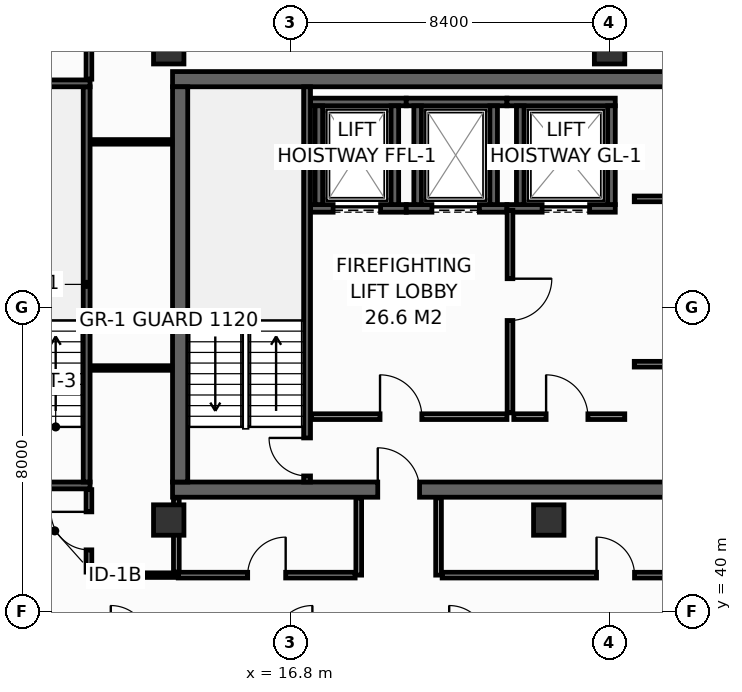
"""IFC4 building model, lengths in metres.
Left out: names, types, materials, properties, quantities, classifications, styles, units other than length and angle.
Written with IfcOpenShell. Run it as: python <this file> out.ifc"""

import sys

from ifc_helpers import new_model, si_unit, direction, frame, frame_2d, origin, origin_2d, place, context, subcontext, project, spatial, rectangle, hollow_rectangle, extrude, element, fill, save


model = new_model("IFC4")
c1 = context("Model", 3, precision=1e-05, world=origin(), true_north=direction((0.0, 1.0)))
c2 = subcontext(c1, "Body", "Model", "MODEL_VIEW")
j1 = project(units=[si_unit("LENGTHUNIT", "METRE"), si_unit("PLANEANGLEUNIT", "RADIAN")], contexts=[c1])
p1 = place(None, origin())
s1 = spatial("IfcSite", under=j1, at=p1, CompositionType="ELEMENT")
p2 = place(p1, origin())
s2 = spatial("IfcBuilding", under=s1, at=p2, CompositionType="ELEMENT")
p3 = place(p2, frame((0.0, 0.0, 238.2)))
s3 = spatial("IfcBuildingStorey", under=s2, at=p3, CompositionType="ELEMENT", Elevation=238.2)
p4 = place(p3, frame((13.7, 43.2, 0.0), z_axis=(0.0, 0.0, 1.0), x_axis=(1.0, 0.0, 0.0)))
e1 = element("IfcWall", 1, at=p4, inside=s3, PredefinedType="SHEAR", context=c2, shape_type="SweptSolid", body=[
    extrude(rectangle(XDim=32.5, YDim=0.4, at=frame_2d((16.25, 0.0))), origin(), (0.0, 0.0, 1.0), 3.55),
])
p5 = place(p4, frame((5.4, 0.0, 0.0)))
e2 = element("IfcOpeningElement", 2, at=p5, cuts=e1, PredefinedType="OPENING", context=c2, shape_type="SweptSolid", body=[
    extrude(rectangle(XDim=1.1, YDim=2.15, at=frame_2d((0.55, 1.075))), frame((0.0, 0.21, 0.0), z_axis=(0.0, -1.0, 0.0), x_axis=(1.0, 0.0, 0.0)), (0.0, 0.0, 1.0), 0.42),
])
p6 = place(p4, frame((25.6, 0.0, 0.0)))
e3 = element("IfcOpeningElement", 3, at=p6, cuts=e1, PredefinedType="OPENING", context=c2, shape_type="SweptSolid", body=[
    extrude(rectangle(XDim=1.1, YDim=2.15, at=frame_2d((0.55, 1.075))), frame((0.0, 0.21, 0.0), z_axis=(0.0, -1.0, 0.0), x_axis=(1.0, 0.0, 0.0)), (0.0, 0.0, 1.0), 0.42),
])
p7 = place(p3, frame((13.7, 54.0, 0.0), z_axis=(0.0, 0.0, 1.0), x_axis=(1.0, 0.0, 0.0)))
e4 = element("IfcWall", 4, at=p7, inside=s3, PredefinedType="SHEAR", context=c2, shape_type="SweptSolid", body=[
    extrude(rectangle(XDim=32.5, YDim=0.4, at=frame_2d((16.25, 0.0))), origin(), (0.0, 0.0, 1.0), 3.55),
])
p8 = place(p3, frame((13.9, 43.4, 0.0), z_axis=(0.0, 0.0, 1.0), x_axis=(0.0, 1.0, 0.0)))
e5 = element("IfcWall", 5, at=p8, inside=s3, PredefinedType="SHEAR", context=c2, shape_type="SweptSolid", body=[
    extrude(rectangle(XDim=10.4, YDim=0.4, at=frame_2d((5.2, 0.0))), origin(), (0.0, 0.0, 1.0), 3.55),
])
for number, where, z_axis, x_axis in (
    (6, (13.6, 54.8, 0.0), (0.0, 0.0, 1.0), (1.0, 0.0, 0.0)),
    (7, (25.2, 54.8, 0.0), (0.0, 0.0, 1.0), (1.0, 0.0, 0.0)),
    (8, (13.6, 42.4, 0.0), (0.0, 0.0, 1.0), (1.0, 0.0, 0.0)),
    (9, (23.6, 42.4, 0.0), (0.0, 0.0, 1.0), (1.0, 0.0, 0.0)),
):
    element("IfcColumn", number, at=place(p3, frame(where, z_axis=z_axis, x_axis=x_axis)), inside=s3, PredefinedType="COLUMN", context=c2, shape_type="SweptSolid", body=[
        extrude(hollow_rectangle(XDim=0.8, YDim=0.8, WallThickness=0.036, at=origin_2d()), origin(), (0.0, 0.0, 1.0), 3.8),
    ])
p9 = place(p3, frame((17.33, 50.6, 0.0), z_axis=(0.0, 0.0, 1.0), x_axis=(1.0, 0.0, 0.0)))
e10 = element("IfcWall", 10, at=p9, inside=s3, PredefinedType="SHEAR", context=c2, shape_type="SweptSolid", body=[
    extrude(rectangle(XDim=2.52, YDim=0.2, at=frame_2d((1.26, 0.0))), origin(), (0.0, 0.0, 1.0), 3.55),
])
p10 = place(p9, frame((0.595, 0.0, 0.0)))
e11 = element("IfcOpeningElement", 11, at=p10, cuts=e10, PredefinedType="OPENING", context=c2, shape_type="SweptSolid", body=[
    extrude(rectangle(XDim=1.25, YDim=2.3, at=frame_2d((0.625, 1.15))), frame((0.0, 0.11, 0.0), z_axis=(0.0, -1.0, 0.0), x_axis=(1.0, 0.0, 0.0)), (0.0, 0.0, 1.0), 0.22),
])
p11 = place(p3, frame((17.33, 53.4, 0.0), z_axis=(0.0, 0.0, 1.0), x_axis=(1.0, 0.0, 0.0)))
e12 = element("IfcWall", 12, at=p11, inside=s3, PredefinedType="SHEAR", context=c2, shape_type="SweptSolid", body=[
    extrude(rectangle(XDim=2.52, YDim=0.2, at=frame_2d((1.26, 0.0))), origin(), (0.0, 0.0, 1.0), 3.55),
])
for number, where, z_axis, x_axis in (
    (13, (17.55, 50.7, 0.0), (0.0, 0.0, 1.0), (0.0, 1.0, 0.0)),
    (14, (19.55, 50.7, 0.0), (0.0, 0.0, 1.0), (0.0, 1.0, 0.0)),
):
    element("IfcWall", number, at=place(p3, frame(where, z_axis=z_axis, x_axis=x_axis)), inside=s3, PredefinedType="SHEAR", context=c2, shape_type="SweptSolid", body=[
        extrude(rectangle(XDim=2.6, YDim=0.2, at=frame_2d((1.3, 0.0))), origin(), (0.0, 0.0, 1.0), 3.55),
    ])
p12 = place(p3, frame((19.85, 50.6, 0.0), z_axis=(0.0, 0.0, 1.0), x_axis=(1.0, 0.0, 0.0)))
e15 = element("IfcWall", 15, at=p12, inside=s3, PredefinedType="SHEAR", context=c2, shape_type="SweptSolid", body=[
    extrude(rectangle(XDim=2.65, YDim=0.2, at=frame_2d((1.325, 0.0))), origin(), (0.0, 0.0, 1.0), 3.55),
])
p13 = place(p12, frame((0.675, 0.0, 0.0)))
e16 = element("IfcOpeningElement", 16, at=p13, cuts=e15, PredefinedType="OPENING", context=c2, shape_type="SweptSolid", body=[
    extrude(rectangle(XDim=1.25, YDim=2.3, at=frame_2d((0.625, 1.15))), frame((0.0, 0.11, 0.0), z_axis=(0.0, -1.0, 0.0), x_axis=(1.0, 0.0, 0.0)), (0.0, 0.0, 1.0), 0.22),
])
p14 = place(p3, frame((19.85, 53.4, 0.0), z_axis=(0.0, 0.0, 1.0), x_axis=(1.0, 0.0, 0.0)))
e17 = element("IfcWall", 17, at=p14, inside=s3, PredefinedType="SHEAR", context=c2, shape_type="SweptSolid", body=[
    extrude(rectangle(XDim=2.65, YDim=0.2, at=frame_2d((1.325, 0.0))), origin(), (0.0, 0.0, 1.0), 3.55),
])
for number, where, z_axis, x_axis in (
    (18, (20.15, 50.7, 0.0), (0.0, 0.0, 1.0), (0.0, 1.0, 0.0)),
    (19, (22.15, 50.7, 0.0), (0.0, 0.0, 1.0), (0.0, 1.0, 0.0)),
):
    element("IfcWall", number, at=place(p3, frame(where, z_axis=z_axis, x_axis=x_axis)), inside=s3, PredefinedType="SHEAR", context=c2, shape_type="SweptSolid", body=[
        extrude(rectangle(XDim=2.6, YDim=0.2, at=frame_2d((1.3, 0.0))), origin(), (0.0, 0.0, 1.0), 3.55),
    ])
p15 = place(p3, frame((22.5, 50.6, 0.0), z_axis=(0.0, 0.0, 1.0), x_axis=(1.0, 0.0, 0.0)))
e20 = element("IfcWall", 20, at=p15, inside=s3, PredefinedType="SHEAR", context=c2, shape_type="SweptSolid", body=[
    extrude(rectangle(XDim=2.85, YDim=0.2, at=frame_2d((1.425, 0.0))), origin(), (0.0, 0.0, 1.0), 3.55),
])
p16 = place(p15, frame((0.925, 0.0, 0.0)))
e21 = element("IfcOpeningElement", 21, at=p16, cuts=e20, PredefinedType="OPENING", context=c2, shape_type="SweptSolid", body=[
    extrude(rectangle(XDim=1.25, YDim=2.3, at=frame_2d((0.625, 1.15))), frame((0.0, 0.11, 0.0), z_axis=(0.0, -1.0, 0.0), x_axis=(1.0, 0.0, 0.0)), (0.0, 0.0, 1.0), 0.22),
])
p17 = place(p3, frame((22.5, 53.4, 0.0), z_axis=(0.0, 0.0, 1.0), x_axis=(1.0, 0.0, 0.0)))
e22 = element("IfcWall", 22, at=p17, inside=s3, PredefinedType="SHEAR", context=c2, shape_type="SweptSolid", body=[
    extrude(rectangle(XDim=2.85, YDim=0.2, at=frame_2d((1.425, 0.0))), origin(), (0.0, 0.0, 1.0), 3.55),
])
for number, where, z_axis, x_axis in (
    (23, (22.85, 50.7, 0.0), (0.0, 0.0, 1.0), (0.0, 1.0, 0.0)),
    (24, (25.25, 50.7, 0.0), (0.0, 0.0, 1.0), (0.0, 1.0, 0.0)),
):
    element("IfcWall", number, at=place(p3, frame(where, z_axis=z_axis, x_axis=x_axis)), inside=s3, PredefinedType="SHEAR", context=c2, shape_type="SweptSolid", body=[
        extrude(rectangle(XDim=2.6, YDim=0.2, at=frame_2d((1.3, 0.0))), origin(), (0.0, 0.0, 1.0), 3.55),
    ])
p18 = place(p3, frame((17.24, 43.4, 0.0), z_axis=(0.0, 0.0, 1.0), x_axis=(0.0, 1.0, 0.0)))
e25 = element("IfcWall", 25, at=p18, inside=s3, PredefinedType="SHEAR", context=c2, shape_type="SweptSolid", body=[
    extrude(rectangle(XDim=10.4, YDim=0.18, at=frame_2d((5.2, 0.0))), origin(), (0.0, 0.0, 1.0), 3.55),
])
p19 = place(p18, frame((0.16, 0.0, 0.0)))
e26 = element("IfcOpeningElement", 26, at=p19, cuts=e25, PredefinedType="OPENING", context=c2, shape_type="SweptSolid", body=[
    extrude(rectangle(XDim=1.0, YDim=2.15, at=frame_2d((0.5, 1.075))), frame((0.0, 0.1, 0.0), z_axis=(0.0, -1.0, 0.0), x_axis=(1.0, 0.0, 0.0)), (0.0, 0.0, 1.0), 0.2),
])
p20 = place(p3, frame((8.12, 43.31, 0.0), z_axis=(0.0, 0.0, 1.0), x_axis=(1.0, 0.0, 0.0)))
e27 = element("IfcWall", 27, at=p20, inside=s3, PredefinedType="SHEAR", context=c2, shape_type="SweptSolid", body=[
    extrude(rectangle(XDim=3.41, YDim=0.18, at=frame_2d((1.705, 0.0))), origin(), (0.0, 0.0, 1.0), 3.55),
])
p21 = place(p20, frame((1.15, 0.0, 0.0)))
e28 = element("IfcOpeningElement", 28, at=p21, cuts=e27, PredefinedType="OPENING", context=c2, shape_type="SweptSolid", body=[
    extrude(rectangle(XDim=1.1, YDim=2.15, at=frame_2d((0.55, 1.075))), frame((0.0, 0.1, 0.0), z_axis=(0.0, -1.0, 0.0), x_axis=(1.0, 0.0, 0.0)), (0.0, 0.0, 1.0), 0.2),
])
p22 = place(p3, frame((11.44, 43.4, 0.0), z_axis=(0.0, 0.0, 1.0), x_axis=(0.0, 1.0, 0.0)))
e29 = element("IfcWall", 29, at=p22, inside=s3, PredefinedType="SHEAR", context=c2, shape_type="SweptSolid", body=[
    extrude(rectangle(XDim=10.4, YDim=0.18, at=frame_2d((5.2, 0.0))), origin(), (0.0, 0.0, 1.0), 3.55),
])
p23 = place(p3, frame((11.53, 53.89, 0.0), z_axis=(0.0, 0.0, 1.0), x_axis=(-1.0, 0.0, 0.0)))
e30 = element("IfcWall", 30, at=p23, inside=s3, PredefinedType="SHEAR", context=c2, shape_type="SweptSolid", body=[
    extrude(rectangle(XDim=3.41, YDim=0.18, at=frame_2d((1.705, 0.0))), origin(), (0.0, 0.0, 1.0), 3.55),
])
p24 = place(p3, frame((17.36, 45.12, 0.0), z_axis=(0.0, 0.0, 1.0), x_axis=(1.0, 0.0, 0.0)))
e31 = element("IfcWall", 31, at=p24, inside=s3, PredefinedType="PARTITIONING", context=c2, shape_type="SweptSolid", body=[
    extrude(rectangle(XDim=5.14, YDim=0.15, at=frame_2d((2.57, 0.0))), origin(), (0.0, 0.0, 1.0), 3.55),
])
p25 = place(p24, frame((1.8, 0.0, 0.0)))
e32 = element("IfcOpeningElement", 32, at=p25, cuts=e31, PredefinedType="OPENING", context=c2, shape_type="SweptSolid", body=[
    extrude(rectangle(XDim=1.1, YDim=2.15, at=frame_2d((0.55, 1.075))), frame((0.0, 0.085, 0.0), z_axis=(0.0, -1.0, 0.0), x_axis=(1.0, 0.0, 0.0)), (0.0, 0.0, 1.0), 0.17),
])
p26 = place(p3, frame((22.58, 50.55, 0.0), z_axis=(0.0, 0.0, 1.0), x_axis=(0.0, -1.0, 0.0)))
e33 = element("IfcWall", 33, at=p26, inside=s3, PredefinedType="PARTITIONING", context=c2, shape_type="SweptSolid", body=[
    extrude(rectangle(XDim=5.33, YDim=0.15, at=frame_2d((2.665, 0.0))), origin(), (0.0, 0.0, 1.0), 3.55),
])
p27 = place(p26, frame((1.8, 0.0, 0.0)))
e34 = element("IfcOpeningElement", 34, at=p27, cuts=e33, PredefinedType="OPENING", context=c2, shape_type="SweptSolid", body=[
    extrude(rectangle(XDim=1.1, YDim=2.15, at=frame_2d((0.55, 1.075))), frame((0.0, 0.085, 0.0), z_axis=(0.0, -1.0, 0.0), x_axis=(1.0, 0.0, 0.0)), (0.0, 0.0, 1.0), 0.17),
])
p28 = place(p3, frame((22.68, 45.12, 0.0), z_axis=(0.0, 0.0, 1.0), x_axis=(1.0, 0.0, 0.0)))
e35 = element("IfcWall", 35, at=p28, inside=s3, PredefinedType="PARTITIONING", context=c2, shape_type="SweptSolid", body=[
    extrude(rectangle(XDim=2.92, YDim=0.15, at=frame_2d((1.46, 0.0))), origin(), (0.0, 0.0, 1.0), 3.55),
])
p29 = place(p28, frame((0.85, 0.0, 0.0)))
e36 = element("IfcOpeningElement", 36, at=p29, cuts=e35, PredefinedType="OPENING", context=c2, shape_type="SweptSolid", body=[
    extrude(rectangle(XDim=1.1, YDim=2.15, at=frame_2d((0.55, 1.075))), frame((0.0, 0.085, 0.0), z_axis=(0.0, -1.0, 0.0), x_axis=(1.0, 0.0, 0.0)), (0.0, 0.0, 1.0), 0.17),
])
p30 = place(p3, frame((25.85, 50.85, 0.0), z_axis=(0.0, 0.0, 1.0), x_axis=(1.0, 0.0, 0.0)))
e37 = element("IfcWall", 37, at=p30, inside=s3, PredefinedType="PARTITIONING", context=c2, shape_type="SweptSolid", body=[
    extrude(rectangle(XDim=7.65, YDim=0.15, at=frame_2d((3.825, 0.0))), origin(), (0.0, 0.0, 1.0), 3.55),
])
p31 = place(p30, frame((1.25, 0.0, 0.0)))
e38 = element("IfcOpeningElement", 38, at=p31, cuts=e37, PredefinedType="OPENING", context=c2, shape_type="SweptSolid", body=[
    extrude(rectangle(XDim=0.95, YDim=2.15, at=frame_2d((0.475, 1.075))), frame((0.0, 0.085, 0.0), z_axis=(0.0, -1.0, 0.0), x_axis=(1.0, 0.0, 0.0)), (0.0, 0.0, 1.0), 0.17),
])
p32 = place(p3, frame((25.85, 46.5, 0.0), z_axis=(0.0, 0.0, 1.0), x_axis=(1.0, 0.0, 0.0)))
e39 = element("IfcWall", 39, at=p32, inside=s3, PredefinedType="PARTITIONING", context=c2, shape_type="SweptSolid", body=[
    extrude(rectangle(XDim=7.65, YDim=0.15, at=frame_2d((3.825, 0.0))), origin(), (0.0, 0.0, 1.0), 3.55),
])
p33 = place(p32, frame((2.8, 0.0, 0.0)))
e40 = element("IfcOpeningElement", 40, at=p33, cuts=e39, PredefinedType="OPENING", context=c2, shape_type="SweptSolid", body=[
    extrude(rectangle(XDim=0.95, YDim=2.15, at=frame_2d((0.475, 1.075))), frame((0.0, 0.085, 0.0), z_axis=(0.0, -1.0, 0.0), x_axis=(1.0, 0.0, 0.0)), (0.0, 0.0, 1.0), 0.17),
])
p34 = place(p3, frame((11.5, 40.95, 0.0), z_axis=(0.0, 0.0, 1.0), x_axis=(1.0, 0.0, 0.0)))
e41 = element("IfcWall", 41, at=p34, inside=s3, PredefinedType="PARTITIONING", context=c2, shape_type="SweptSolid", body=[
    extrude(rectangle(XDim=2.35, YDim=0.12, at=frame_2d((1.175, 0.0))), origin(), (0.0, 0.0, 1.0), 3.55),
])
p35 = place(p3, frame((11.55, 52.35, 0.0), z_axis=(0.0, 0.0, 1.0), x_axis=(1.0, 0.0, 0.0)))
e42 = element("IfcWall", 42, at=p35, inside=s3, PredefinedType="PARTITIONING", context=c2, shape_type="SweptSolid", body=[
    extrude(rectangle(XDim=2.13, YDim=0.12, at=frame_2d((1.065, 0.0))), origin(), (0.0, 0.0, 1.0), 3.55),
])
p36 = place(p3, frame((11.5, 54.0, 0.0), z_axis=(0.0, 0.0, 1.0), x_axis=(0.0, 1.0, 0.0)))
e43 = element("IfcWall", 43, at=p36, inside=s3, PredefinedType="PARTITIONING", context=c2, shape_type="SweptSolid", body=[
    extrude(rectangle(XDim=1.995, YDim=0.15, at=frame_2d((0.998, 0.0))), origin(), (0.0, 0.0, 1.0), 2.935),
])
p37 = place(p3, frame((11.55, 46.4, 0.0), z_axis=(0.0, 0.0, 1.0), x_axis=(1.0, 0.0, 0.0)))
e44 = element("IfcWall", 44, at=p37, inside=s3, PredefinedType="PARTITIONING", context=c2, shape_type="SweptSolid", body=[
    extrude(rectangle(XDim=2.13, YDim=0.12, at=frame_2d((1.065, 0.0))), origin(), (0.0, 0.0, 1.0), 3.55),
])
p38 = place(p3, frame((11.5, 41.03, 0.0), z_axis=(0.0, 0.0, 1.0), x_axis=(0.0, 1.0, 0.0)))
e45 = element("IfcWall", 45, at=p38, inside=s3, PredefinedType="PARTITIONING", context=c2, shape_type="SweptSolid", body=[
    extrude(rectangle(XDim=2.17, YDim=0.15, at=frame_2d((1.085, 0.0))), origin(), (0.0, 0.0, 1.0), 2.947),
])
p39 = place(p38, frame((0.585, 0.0, 0.0)))
e46 = element("IfcOpeningElement", 46, at=p39, cuts=e45, PredefinedType="OPENING", context=c2, shape_type="SweptSolid", body=[
    extrude(rectangle(XDim=1.0, YDim=2.15, at=frame_2d((0.5, 1.075))), frame((0.0, 0.085, 0.0), z_axis=(0.0, -1.0, 0.0), x_axis=(1.0, 0.0, 0.0)), (0.0, 0.0, 1.0), 0.17),
])
p40 = place(p3, frame((13.8, 41.03, 0.0), z_axis=(0.0, 0.0, 1.0), x_axis=(0.0, 1.0, 0.0)))
e47 = element("IfcWall", 47, at=p40, inside=s3, PredefinedType="PARTITIONING", context=c2, shape_type="SweptSolid", body=[
    extrude(rectangle(XDim=1.95, YDim=0.15, at=frame_2d((0.975, 0.0))), origin(), (0.0, 0.0, 1.0), 3.55),
])
for number, where, z_axis, x_axis in (
    (48, (18.6, 40.95, 0.0), (0.0, 0.0, 1.0), (0.0, 1.0, 0.0)),
    (49, (20.7, 40.95, 0.0), (0.0, 0.0, 1.0), (0.0, 1.0, 0.0)),
):
    element("IfcWall", number, at=place(p3, frame(where, z_axis=z_axis, x_axis=x_axis)), inside=s3, PredefinedType="PARTITIONING", context=c2, shape_type="SweptSolid", body=[
        extrude(rectangle(XDim=2.03, YDim=0.15, at=frame_2d((1.015, 0.0))), origin(), (0.0, 0.0, 1.0), 3.55),
    ])
p41 = place(p3, frame((13.85, 40.95, 0.0), z_axis=(0.0, 0.0, 1.0), x_axis=(1.0, 0.0, 0.0)))
e50 = element("IfcWall", 50, at=p41, inside=s3, PredefinedType="PARTITIONING", context=c2, shape_type="SweptSolid", body=[
    extrude(rectangle(XDim=4.655, YDim=0.15, at=frame_2d((2.327, 0.0))), origin(), (0.0, 0.0, 1.0), 3.55),
])
p42 = place(p41, frame((1.827, 0.0, 0.0)))
e51 = element("IfcOpeningElement", 51, at=p42, cuts=e50, PredefinedType="OPENING", context=c2, shape_type="SweptSolid", body=[
    extrude(rectangle(XDim=1.0, YDim=2.15, at=frame_2d((0.5, 1.075))), frame((0.0, 0.085, 0.0), z_axis=(0.0, -1.0, 0.0), x_axis=(1.0, 0.0, 0.0)), (0.0, 0.0, 1.0), 0.17),
])
p43 = place(p3, frame((20.795, 40.95, 0.0), z_axis=(0.0, 0.0, 1.0), x_axis=(1.0, 0.0, 0.0)))
e52 = element("IfcWall", 52, at=p43, inside=s3, PredefinedType="PARTITIONING", context=c2, shape_type="SweptSolid", body=[
    extrude(rectangle(XDim=9.125, YDim=0.15, at=frame_2d((4.562, 0.0))), origin(), (0.0, 0.0, 1.0), 2.947),
])
p44 = place(p43, frame((4.062, 0.0, 0.0)))
e53 = element("IfcOpeningElement", 53, at=p44, cuts=e52, PredefinedType="OPENING", context=c2, shape_type="SweptSolid", body=[
    extrude(rectangle(XDim=1.0, YDim=2.15, at=frame_2d((0.5, 1.075))), frame((0.0, 0.085, 0.0), z_axis=(0.0, -1.0, 0.0), x_axis=(1.0, 0.0, 0.0)), (0.0, 0.0, 1.0), 0.17),
])
p45 = place(p10, origin())
e54 = element("IfcDoor", 54, at=p45, inside=s3, OperationType="SLIDING_TO_LEFT", PredefinedType="DOOR", context=c2, shape_type="SweptSolid", body=[
    extrude(rectangle(XDim=1.25, YDim=2.3, at=frame_2d((0.625, 1.15))), frame((0.0, 0.025, 0.0), z_axis=(0.0, -1.0, 0.0), x_axis=(1.0, 0.0, 0.0)), (0.0, 0.0, 1.0), 0.05),
])
fill(e11, e54)
p46 = place(p13, origin())
e55 = element("IfcDoor", 55, at=p46, inside=s3, OperationType="SLIDING_TO_LEFT", PredefinedType="DOOR", context=c2, shape_type="SweptSolid", body=[
    extrude(rectangle(XDim=1.25, YDim=2.3, at=frame_2d((0.625, 1.15))), frame((0.0, 0.025, 0.0), z_axis=(0.0, -1.0, 0.0), x_axis=(1.0, 0.0, 0.0)), (0.0, 0.0, 1.0), 0.05),
])
fill(e16, e55)
p47 = place(p16, origin())
e56 = element("IfcDoor", 56, at=p47, inside=s3, OperationType="SLIDING_TO_LEFT", PredefinedType="DOOR", context=c2, shape_type="SweptSolid", body=[
    extrude(rectangle(XDim=1.25, YDim=2.3, at=frame_2d((0.625, 1.15))), frame((0.0, 0.025, 0.0), z_axis=(0.0, -1.0, 0.0), x_axis=(1.0, 0.0, 0.0)), (0.0, 0.0, 1.0), 0.05),
])
fill(e21, e56)
p48 = place(p19, origin())
e57 = element("IfcDoor", 57, at=p48, inside=s3, OperationType="SINGLE_SWING_RIGHT", PredefinedType="DOOR", context=c2, shape_type="SweptSolid", body=[
    extrude(rectangle(XDim=1.0, YDim=2.15, at=frame_2d((0.5, 1.075))), frame((0.0, 0.025, 0.0), z_axis=(0.0, -1.0, 0.0), x_axis=(1.0, 0.0, 0.0)), (0.0, 0.0, 1.0), 0.05),
])
fill(e26, e57)
p49 = place(p25, origin())
e58 = element("IfcDoor", 58, at=p49, inside=s3, OperationType="SINGLE_SWING_LEFT", PredefinedType="DOOR", context=c2, shape_type="SweptSolid", body=[
    extrude(rectangle(XDim=1.1, YDim=2.15, at=frame_2d((0.55, 1.075))), frame((0.0, 0.025, 0.0), z_axis=(0.0, -1.0, 0.0), x_axis=(1.0, 0.0, 0.0)), (0.0, 0.0, 1.0), 0.05),
])
fill(e32, e58)
p50 = place(p27, origin())
e59 = element("IfcDoor", 59, at=p50, inside=s3, OperationType="SINGLE_SWING_LEFT", PredefinedType="DOOR", context=c2, shape_type="SweptSolid", body=[
    extrude(rectangle(XDim=1.1, YDim=2.15, at=frame_2d((0.55, 1.075))), frame((0.0, 0.025, 0.0), z_axis=(0.0, -1.0, 0.0), x_axis=(1.0, 0.0, 0.0)), (0.0, 0.0, 1.0), 0.05),
])
fill(e34, e59)
p51 = place(p29, origin())
e60 = element("IfcDoor", 60, at=p51, inside=s3, OperationType="SINGLE_SWING_LEFT", PredefinedType="DOOR", context=c2, shape_type="SweptSolid", body=[
    extrude(rectangle(XDim=1.1, YDim=2.15, at=frame_2d((0.55, 1.075))), frame((0.0, 0.025, 0.0), z_axis=(0.0, -1.0, 0.0), x_axis=(1.0, 0.0, 0.0)), (0.0, 0.0, 1.0), 0.05),
])
fill(e36, e60)
p52 = place(p5, origin())
e61 = element("IfcDoor", 61, at=p52, inside=s3, OperationType="SINGLE_SWING_LEFT", PredefinedType="DOOR", context=c2, shape_type="SweptSolid", body=[
    extrude(rectangle(XDim=1.1, YDim=2.15, at=frame_2d((0.55, 1.075))), frame((0.0, 0.025, 0.0), z_axis=(0.0, -1.0, 0.0), x_axis=(1.0, 0.0, 0.0)), (0.0, 0.0, 1.0), 0.05),
])
fill(e2, e61)
p53 = place(p39, origin())
e62 = element("IfcDoor", 62, at=p53, inside=s3, OperationType="SINGLE_SWING_RIGHT", PredefinedType="DOOR", context=c2, shape_type="SweptSolid", body=[
    extrude(rectangle(XDim=1.0, YDim=2.15, at=frame_2d((0.5, 1.075))), frame((0.0, 0.025, 0.0), z_axis=(0.0, -1.0, 0.0), x_axis=(1.0, 0.0, 0.0)), (0.0, 0.0, 1.0), 0.05),
])
fill(e46, e62)
p54 = place(p42, origin())
e63 = element("IfcDoor", 63, at=p54, inside=s3, OperationType="SINGLE_SWING_RIGHT", PredefinedType="DOOR", context=c2, shape_type="SweptSolid", body=[
    extrude(rectangle(XDim=1.0, YDim=2.15, at=frame_2d((0.5, 1.075))), frame((0.0, 0.025, 0.0), z_axis=(0.0, -1.0, 0.0), x_axis=(1.0, 0.0, 0.0)), (0.0, 0.0, 1.0), 0.05),
])
fill(e51, e63)
p55 = place(p44, origin())
e64 = element("IfcDoor", 64, at=p55, inside=s3, OperationType="SINGLE_SWING_LEFT", PredefinedType="DOOR", context=c2, shape_type="SweptSolid", body=[
    extrude(rectangle(XDim=1.0, YDim=2.15, at=frame_2d((0.5, 1.075))), frame((0.0, 0.025, 0.0), z_axis=(0.0, -1.0, 0.0), x_axis=(1.0, 0.0, 0.0)), (0.0, 0.0, 1.0), 0.05),
])
fill(e53, e64)
save(model, sys.argv[1])
